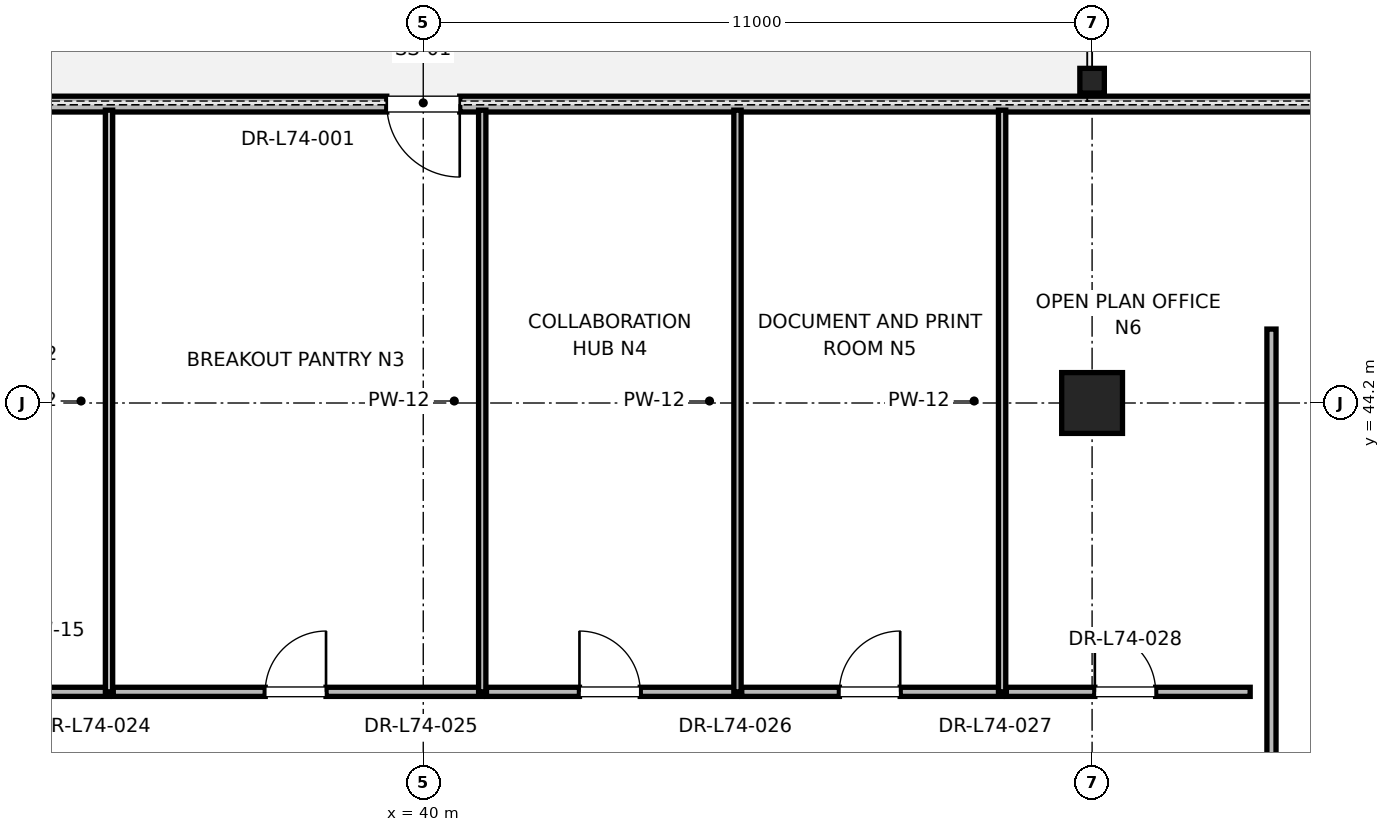
"""IFC4 building model, lengths in metres.
Left out: names, types, materials, properties, quantities, classifications, styles, units other than length and angle.
Written with IfcOpenShell. Run it as: python <this file> out.ifc"""

import sys

from ifc_helpers import new_model, si_unit, direction, frame, frame_2d, origin, origin_2d, place, context, subcontext, project, spatial, rectangle, i_section, extrude, element, fill, save


model = new_model("IFC4")
c1 = context("Model", 3, precision=1e-05, world=origin(), true_north=direction((0.0, 1.0)))
c2 = subcontext(c1, "Body", "Model", "MODEL_VIEW")
j1 = project(units=[si_unit("LENGTHUNIT", "METRE"), si_unit("PLANEANGLEUNIT", "RADIAN")], contexts=[c1])
p1 = place(None, origin())
s1 = spatial("IfcSite", under=j1, at=p1, CompositionType="ELEMENT")
p2 = place(p1, origin())
s2 = spatial("IfcBuilding", under=s1, at=p2, CompositionType="ELEMENT")
p3 = place(p2, frame((0.0, 0.0, 318.8)))
s3 = spatial("IfcBuildingStorey", under=s2, at=p3, CompositionType="ELEMENT", Elevation=318.8)
p4 = place(p3, frame((51.0, 44.2, 0.0), z_axis=(0.0, 0.0, 1.0), x_axis=(1.0, 0.0, 0.0)))
e1 = element("IfcColumn", 1, at=p4, inside=s3, PredefinedType="COLUMN", context=c2, shape_type="SweptSolid", body=[
    extrude(rectangle(XDim=1.0, YDim=1.0, at=origin_2d()), origin(), (0.0, 0.0, 1.0), 4.0),
])
p5 = place(p3, frame((51.0, 49.5, 0.0), z_axis=(0.0, 0.0, 1.0), x_axis=(1.0, 0.0, 0.0)))
e2 = element("IfcColumn", 2, at=p5, inside=s3, PredefinedType="COLUMN", context=c2, shape_type="SweptSolid", body=[
    extrude(i_section(OverallWidth=0.403, OverallDepth=0.406, WebThickness=0.027, FlangeThickness=0.043, FilletRadius=0.015, at=origin_2d()), origin(), (0.0, 0.0, 1.0), 4.0),
])
p6 = place(p3, frame((61.031, 49.116, 0.0), z_axis=(0.0, 0.0, 1.0), x_axis=(-1.0, 0.0, 0.0)))
e3 = element("IfcWall", 3, at=p6, inside=s3, PredefinedType="PARAPET", context=c2, shape_type="SweptSolid", body=[
    extrude(rectangle(XDim=42.063, YDim=0.26, at=frame_2d((21.031, 0.0))), origin(), (0.0, 0.0, 1.0), 3.196),
])
p7 = place(p6, frame((4.2, 0.0, 0.85)))
e4 = element("IfcOpeningElement", 4, at=p7, cuts=e3, PredefinedType="OPENING", context=c2, shape_type="SweptSolid", body=[
    extrude(rectangle(XDim=1.6, YDim=2.1, at=frame_2d((0.8, 1.05))), frame((0.0, 0.13, 0.0), z_axis=(0.0, -1.0, 0.0), x_axis=(1.0, 0.0, 0.0)), (0.0, 0.0, 1.0), 0.26),
])
p8 = place(p6, frame((20.431, 0.0, 0.0)))
e5 = element("IfcOpeningElement", 5, at=p8, cuts=e3, PredefinedType="OPENING", context=c2, shape_type="SweptSolid", body=[
    extrude(rectangle(XDim=1.2, YDim=2.2, at=frame_2d((0.6, 1.1))), frame((0.0, 0.13, 0.0), z_axis=(0.0, -1.0, 0.0), x_axis=(1.0, 0.0, 0.0)), (0.0, 0.0, 1.0), 0.26),
])
p9 = place(p6, frame((36.263, 0.0, 0.85)))
e6 = element("IfcOpeningElement", 6, at=p9, cuts=e3, PredefinedType="OPENING", context=c2, shape_type="SweptSolid", body=[
    extrude(rectangle(XDim=1.6, YDim=2.1, at=frame_2d((0.8, 1.05))), frame((0.0, 0.13, 0.0), z_axis=(0.0, -1.0, 0.0), x_axis=(1.0, 0.0, 0.0)), (0.0, 0.0, 1.0), 0.26),
])
p10 = place(p3, frame((30.278, 39.45, 0.0), z_axis=(0.0, 0.0, 1.0), x_axis=(1.0, 0.0, 0.0)))
e7 = element("IfcWall", 7, at=p10, inside=s3, PredefinedType="PARTITIONING", context=c2, shape_type="SweptSolid", body=[
    extrude(rectangle(XDim=4.554, YDim=0.15, at=frame_2d((2.277, 0.0))), origin(), (0.0, 0.0, 1.0), 2.85),
])
p11 = place(p10, frame((1.742, 0.0, 0.0)))
e8 = element("IfcOpeningElement", 8, at=p11, cuts=e7, PredefinedType="OPENING", context=c2, shape_type="SweptSolid", body=[
    extrude(rectangle(XDim=1.0, YDim=2.15, at=frame_2d((0.5, 1.075))), frame((0.0, 0.075, 0.0), z_axis=(0.0, -1.0, 0.0), x_axis=(1.0, 0.0, 0.0)), (0.0, 0.0, 1.0), 0.15),
])
p12 = place(p3, frame((34.832, 39.45, 0.0), z_axis=(0.0, 0.0, 1.0), x_axis=(0.0, 1.0, 0.0)))
e9 = element("IfcWall", 9, at=p12, inside=s3, PredefinedType="PARTITIONING", context=c2, shape_type="SweptSolid", body=[
    extrude(rectangle(XDim=9.566, YDim=0.12, at=frame_2d((4.783, 0.0))), origin(), (0.0, 0.0, 1.0), 2.415),
])
p13 = place(p3, frame((34.902, 39.45, 0.0), z_axis=(0.0, 0.0, 1.0), x_axis=(1.0, 0.0, 0.0)))
e10 = element("IfcWall", 10, at=p13, inside=s3, PredefinedType="PARTITIONING", context=c2, shape_type="SweptSolid", body=[
    extrude(rectangle(XDim=6.068, YDim=0.15, at=frame_2d((3.034, 0.0))), origin(), (0.0, 0.0, 1.0), 2.85),
])
p14 = place(p13, frame((2.499, 0.0, 0.0)))
e11 = element("IfcOpeningElement", 11, at=p14, cuts=e10, PredefinedType="OPENING", context=c2, shape_type="SweptSolid", body=[
    extrude(rectangle(XDim=1.0, YDim=2.15, at=frame_2d((0.5, 1.075))), frame((0.0, 0.075, 0.0), z_axis=(0.0, -1.0, 0.0), x_axis=(1.0, 0.0, 0.0)), (0.0, 0.0, 1.0), 0.15),
])
p15 = place(p3, frame((40.97, 39.45, 0.0), z_axis=(0.0, 0.0, 1.0), x_axis=(0.0, 1.0, 0.0)))
e12 = element("IfcWall", 12, at=p15, inside=s3, PredefinedType="PARTITIONING", context=c2, shape_type="SweptSolid", body=[
    extrude(rectangle(XDim=9.566, YDim=0.12, at=frame_2d((4.783, 0.0))), origin(), (0.0, 0.0, 1.0), 2.415),
])
p16 = place(p3, frame((41.04, 39.45, 0.0), z_axis=(0.0, 0.0, 1.0), x_axis=(1.0, 0.0, 0.0)))
e13 = element("IfcWall", 13, at=p16, inside=s3, PredefinedType="PARTITIONING", context=c2, shape_type="SweptSolid", body=[
    extrude(rectangle(XDim=4.128, YDim=0.15, at=frame_2d((2.064, 0.0))), origin(), (0.0, 0.0, 1.0), 2.85),
])
p17 = place(p16, frame((1.529, 0.0, 0.0)))
e14 = element("IfcOpeningElement", 14, at=p17, cuts=e13, PredefinedType="OPENING", context=c2, shape_type="SweptSolid", body=[
    extrude(rectangle(XDim=1.0, YDim=2.15, at=frame_2d((0.5, 1.075))), frame((0.0, 0.075, 0.0), z_axis=(0.0, -1.0, 0.0), x_axis=(1.0, 0.0, 0.0)), (0.0, 0.0, 1.0), 0.15),
])
p18 = place(p3, frame((45.168, 39.45, 0.0), z_axis=(0.0, 0.0, 1.0), x_axis=(0.0, 1.0, 0.0)))
e15 = element("IfcWall", 15, at=p18, inside=s3, PredefinedType="PARTITIONING", context=c2, shape_type="SweptSolid", body=[
    extrude(rectangle(XDim=9.566, YDim=0.12, at=frame_2d((4.783, 0.0))), origin(), (0.0, 0.0, 1.0), 2.415),
])
p19 = place(p3, frame((45.238, 39.45, 0.0), z_axis=(0.0, 0.0, 1.0), x_axis=(1.0, 0.0, 0.0)))
e16 = element("IfcWall", 16, at=p19, inside=s3, PredefinedType="PARTITIONING", context=c2, shape_type="SweptSolid", body=[
    extrude(rectangle(XDim=4.282, YDim=0.15, at=frame_2d((2.141, 0.0))), origin(), (0.0, 0.0, 1.0), 2.85),
])
p20 = place(p19, frame((1.606, 0.0, 0.0)))
e17 = element("IfcOpeningElement", 17, at=p20, cuts=e16, PredefinedType="OPENING", context=c2, shape_type="SweptSolid", body=[
    extrude(rectangle(XDim=1.0, YDim=2.15, at=frame_2d((0.5, 1.075))), frame((0.0, 0.075, 0.0), z_axis=(0.0, -1.0, 0.0), x_axis=(1.0, 0.0, 0.0)), (0.0, 0.0, 1.0), 0.15),
])
p21 = place(p3, frame((49.52, 39.45, 0.0), z_axis=(0.0, 0.0, 1.0), x_axis=(0.0, 1.0, 0.0)))
e18 = element("IfcWall", 18, at=p21, inside=s3, PredefinedType="PARTITIONING", context=c2, shape_type="SweptSolid", body=[
    extrude(rectangle(XDim=9.566, YDim=0.12, at=frame_2d((4.783, 0.0))), origin(), (0.0, 0.0, 1.0), 2.415),
])
p22 = place(p3, frame((49.59, 39.45, 0.0), z_axis=(0.0, 0.0, 1.0), x_axis=(1.0, 0.0, 0.0)))
e19 = element("IfcWall", 19, at=p22, inside=s3, PredefinedType="PARTITIONING", context=c2, shape_type="SweptSolid", body=[
    extrude(rectangle(XDim=4.01, YDim=0.15, at=frame_2d((2.005, 0.0))), origin(), (0.0, 0.0, 1.0), 2.85),
])
p23 = place(p22, frame((1.455, 0.0, 0.0)))
e20 = element("IfcOpeningElement", 20, at=p23, cuts=e19, PredefinedType="OPENING", context=c2, shape_type="SweptSolid", body=[
    extrude(rectangle(XDim=1.0, YDim=2.15, at=frame_2d((0.5, 1.075))), frame((0.0, 0.075, 0.0), z_axis=(0.0, -1.0, 0.0), x_axis=(1.0, 0.0, 0.0)), (0.0, 0.0, 1.0), 0.15),
])
p24 = place(p3, frame((53.95, 24.704, 0.0), z_axis=(0.0, 0.0, 1.0), x_axis=(0.0, 1.0, 0.0)))
e21 = element("IfcWall", 21, at=p24, inside=s3, PredefinedType="PARTITIONING", context=c2, shape_type="SweptSolid", body=[
    extrude(rectangle(XDim=20.712, YDim=0.15, at=frame_2d((10.356, 0.0))), origin(), (0.0, 0.0, 1.0), 2.85),
])
p25 = place(p24, frame((5.348, 0.0, 0.0)))
e22 = element("IfcOpeningElement", 22, at=p25, cuts=e21, PredefinedType="OPENING", context=c2, shape_type="SweptSolid", body=[
    extrude(rectangle(XDim=1.0, YDim=2.15, at=frame_2d((0.5, 1.075))), frame((0.0, 0.075, 0.0), z_axis=(0.0, -1.0, 0.0), x_axis=(1.0, 0.0, 0.0)), (0.0, 0.0, 1.0), 0.15),
])
p26 = place(p8, origin())
e23 = element("IfcDoor", 23, at=p26, inside=s3, OperationType="SINGLE_SWING_LEFT", PredefinedType="DOOR", context=c2, shape_type="SweptSolid", body=[
    extrude(rectangle(XDim=1.2, YDim=2.2, at=frame_2d((0.6, 1.1))), frame((0.0, 0.025, 0.0), z_axis=(0.0, -1.0, 0.0), x_axis=(1.0, 0.0, 0.0)), (0.0, 0.0, 1.0), 0.05),
])
fill(e5, e23)
p27 = place(p14, origin())
e24 = element("IfcDoor", 24, at=p27, inside=s3, OperationType="SINGLE_SWING_RIGHT", PredefinedType="DOOR", context=c2, shape_type="SweptSolid", body=[
    extrude(rectangle(XDim=1.0, YDim=2.15, at=frame_2d((0.5, 1.075))), frame((0.0, 0.025, 0.0), z_axis=(0.0, -1.0, 0.0), x_axis=(1.0, 0.0, 0.0)), (0.0, 0.0, 1.0), 0.05),
])
fill(e11, e24)
p28 = place(p17, origin())
e25 = element("IfcDoor", 25, at=p28, inside=s3, OperationType="SINGLE_SWING_LEFT", PredefinedType="DOOR", context=c2, shape_type="SweptSolid", body=[
    extrude(rectangle(XDim=1.0, YDim=2.15, at=frame_2d((0.5, 1.075))), frame((0.0, 0.025, 0.0), z_axis=(0.0, -1.0, 0.0), x_axis=(1.0, 0.0, 0.0)), (0.0, 0.0, 1.0), 0.05),
])
fill(e14, e25)
p29 = place(p20, origin())
e26 = element("IfcDoor", 26, at=p29, inside=s3, OperationType="SINGLE_SWING_RIGHT", PredefinedType="DOOR", context=c2, shape_type="SweptSolid", body=[
    extrude(rectangle(XDim=1.0, YDim=2.15, at=frame_2d((0.5, 1.075))), frame((0.0, 0.025, 0.0), z_axis=(0.0, -1.0, 0.0), x_axis=(1.0, 0.0, 0.0)), (0.0, 0.0, 1.0), 0.05),
])
fill(e17, e26)
p30 = place(p23, origin())
e27 = element("IfcDoor", 27, at=p30, inside=s3, OperationType="SINGLE_SWING_LEFT", PredefinedType="DOOR", context=c2, shape_type="SweptSolid", body=[
    extrude(rectangle(XDim=1.0, YDim=2.15, at=frame_2d((0.5, 1.075))), frame((0.0, 0.025, 0.0), z_axis=(0.0, -1.0, 0.0), x_axis=(1.0, 0.0, 0.0)), (0.0, 0.0, 1.0), 0.05),
])
fill(e20, e27)
save(model, sys.argv[1])
